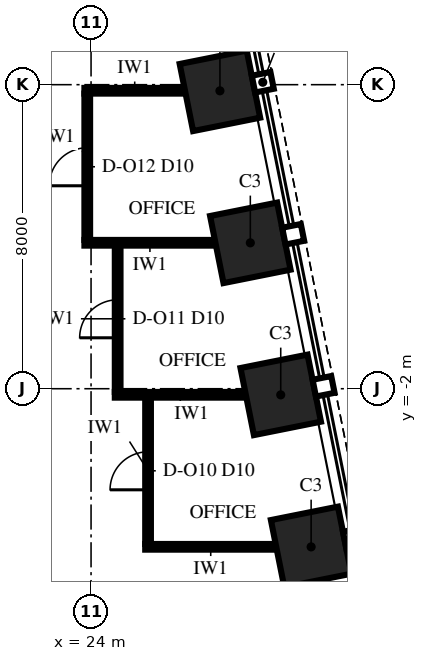
"""IFC4 building model, lengths in metres.
Left out: names, types, materials, properties, quantities, classifications, styles, units other than length and angle.
Written with IfcOpenShell. Run it as: python <this file> out.ifc"""

import sys

from ifc_helpers import new_model, si_unit, direction, frame, frame_2d, origin, origin_2d, place, context, subcontext, project, spatial, rectangle, extrude, element, fill, save


model = new_model("IFC4")
c1 = context("Model", 3, precision=1e-05, world=origin(), true_north=direction((0.0, 1.0)))
c2 = subcontext(c1, "Body", "Model", "MODEL_VIEW")
j1 = project(units=[si_unit("LENGTHUNIT", "METRE"), si_unit("PLANEANGLEUNIT", "RADIAN")], contexts=[c1])
p1 = place(None, origin())
s1 = spatial("IfcSite", under=j1, at=p1, CompositionType="ELEMENT")
p2 = place(p1, origin())
s2 = spatial("IfcBuilding", under=s1, at=p2, CompositionType="ELEMENT")
p3 = place(p2, frame((0.0, 0.0, 159.0)))
s3 = spatial("IfcBuildingStorey", under=s2, at=p3, CompositionType="ELEMENT", Elevation=159.0)
for number, where, z_axis, x_axis in (
    (1, (29.791, -6.162, 0.0), (0.0, 0.0, 1.0), (-0.196, 0.981, 0.0)),
    (2, (28.991, -2.162, 0.0), (0.0, 0.0, 1.0), (-0.196, 0.981, 0.0)),
    (3, (28.191, 1.838, 0.0), (0.0, 0.0, 1.0), (-0.196, 0.981, 0.0)),
    (4, (27.391, 5.838, 0.0), (0.0, 0.0, 1.0), (-0.196, 0.981, 0.0)),
):
    element("IfcColumn", number, at=place(p3, frame(where, z_axis=z_axis, x_axis=x_axis)), inside=s3, PredefinedType="COLUMN", context=c2, shape_type="SweptSolid", body=[
        extrude(rectangle(XDim=1.8, YDim=1.8, at=origin_2d()), origin(), (0.0, 0.0, 1.0), 4.0),
    ])
p4 = place(p3, frame((25.425, -6.16, 0.0), z_axis=(0.0, 0.0, 1.0), x_axis=(1.0, 0.0, 0.0)))
e5 = element("IfcWall", 5, at=p4, inside=s3, PredefinedType="PARTITIONING", context=c2, shape_type="SweptSolid", body=[
    extrude(rectangle(XDim=3.448, YDim=0.15, at=frame_2d((1.724, 0.0))), origin(), (0.0, 0.0, 1.0), 2.842),
])
for number, where, z_axis, x_axis in (
    (6, (24.625, -2.16, 0.0), (0.0, 0.0, 1.0), (1.0, 0.0, 0.0)),
    (7, (23.825, 1.84, 0.0), (0.0, 0.0, 1.0), (1.0, 0.0, 0.0)),
):
    element("IfcWall", number, at=place(p3, frame(where, z_axis=z_axis, x_axis=x_axis)), inside=s3, PredefinedType="PARTITIONING", context=c2, shape_type="SweptSolid", body=[
        extrude(rectangle(XDim=3.448, YDim=0.15, at=frame_2d((1.724, 0.0))), origin(), (0.0, 0.0, 1.0), 3.25),
    ])
p5 = place(p3, frame((23.825, 5.84, 0.0), z_axis=(0.0, 0.0, 1.0), x_axis=(1.0, 0.0, 0.0)))
e8 = element("IfcWall", 8, at=p5, inside=s3, PredefinedType="PARTITIONING", context=c2, shape_type="SweptSolid", body=[
    extrude(rectangle(XDim=2.648, YDim=0.15, at=frame_2d((1.324, 0.0))), origin(), (0.0, 0.0, 1.0), 2.842),
])
p6 = place(p3, frame((23.9, 1.915, 0.0), z_axis=(0.0, 0.0, 1.0), x_axis=(0.0, 1.0, 0.0)))
e9 = element("IfcWall", 9, at=p6, inside=s3, PredefinedType="PARTITIONING", context=c2, shape_type="SweptSolid", body=[
    extrude(rectangle(XDim=3.85, YDim=0.15, at=frame_2d((1.925, 0.0))), origin(), (0.0, 0.0, 1.0), 3.85),
])
p7 = place(p6, frame((1.425, 0.0, 0.0)))
e10 = element("IfcOpeningElement", 10, at=p7, cuts=e9, PredefinedType="OPENING", context=c2, shape_type="SweptSolid", body=[
    extrude(rectangle(XDim=1.0, YDim=2.3, at=frame_2d((0.5, 1.15))), frame((0.0, 0.09, 0.0), z_axis=(0.0, -1.0, 0.0), x_axis=(1.0, 0.0, 0.0)), (0.0, 0.0, 1.0), 0.18),
])
p8 = place(p3, frame((24.7, -2.085, 0.0), z_axis=(0.0, 0.0, 1.0), x_axis=(0.0, 1.0, 0.0)))
e11 = element("IfcWall", 11, at=p8, inside=s3, PredefinedType="PARTITIONING", context=c2, shape_type="SweptSolid", body=[
    extrude(rectangle(XDim=3.85, YDim=0.15, at=frame_2d((1.925, 0.0))), origin(), (0.0, 0.0, 1.0), 3.85),
])
p9 = place(p8, frame((1.425, 0.0, 0.0)))
e12 = element("IfcOpeningElement", 12, at=p9, cuts=e11, PredefinedType="OPENING", context=c2, shape_type="SweptSolid", body=[
    extrude(rectangle(XDim=1.0, YDim=2.3, at=frame_2d((0.5, 1.15))), frame((0.0, 0.09, 0.0), z_axis=(0.0, -1.0, 0.0), x_axis=(1.0, 0.0, 0.0)), (0.0, 0.0, 1.0), 0.18),
])
p10 = place(p3, frame((25.5, -6.085, 0.0), z_axis=(0.0, 0.0, 1.0), x_axis=(0.0, 1.0, 0.0)))
e13 = element("IfcWall", 13, at=p10, inside=s3, PredefinedType="PARTITIONING", context=c2, shape_type="SweptSolid", body=[
    extrude(rectangle(XDim=3.85, YDim=0.15, at=frame_2d((1.925, 0.0))), origin(), (0.0, 0.0, 1.0), 2.842),
])
p11 = place(p10, frame((1.425, 0.0, 0.0)))
e14 = element("IfcOpeningElement", 14, at=p11, cuts=e13, PredefinedType="OPENING", context=c2, shape_type="SweptSolid", body=[
    extrude(rectangle(XDim=1.0, YDim=2.3, at=frame_2d((0.5, 1.15))), frame((0.0, 0.09, 0.0), z_axis=(0.0, -1.0, 0.0), x_axis=(1.0, 0.0, 0.0)), (0.0, 0.0, 1.0), 0.18),
])
p12 = place(p11, origin())
e15 = element("IfcDoor", 15, at=p12, inside=s3, OperationType="SINGLE_SWING_LEFT", PredefinedType="DOOR", context=c2, shape_type="SweptSolid", body=[
    extrude(rectangle(XDim=1.0, YDim=2.3, at=frame_2d((0.5, 1.15))), frame((0.0, 0.075, 0.0), z_axis=(0.0, -1.0, 0.0), x_axis=(1.0, 0.0, 0.0)), (0.0, 0.0, 1.0), 0.149),
])
fill(e14, e15)
p13 = place(p9, origin())
e16 = element("IfcDoor", 16, at=p13, inside=s3, OperationType="SINGLE_SWING_LEFT", PredefinedType="DOOR", context=c2, shape_type="SweptSolid", body=[
    extrude(rectangle(XDim=1.0, YDim=2.3, at=frame_2d((0.5, 1.15))), frame((0.0, 0.075, 0.0), z_axis=(0.0, -1.0, 0.0), x_axis=(1.0, 0.0, 0.0)), (0.0, 0.0, 1.0), 0.149),
])
fill(e12, e16)
p14 = place(p7, origin())
e17 = element("IfcDoor", 17, at=p14, inside=s3, OperationType="SINGLE_SWING_LEFT", PredefinedType="DOOR", context=c2, shape_type="SweptSolid", body=[
    extrude(rectangle(XDim=1.0, YDim=2.3, at=frame_2d((0.5, 1.15))), frame((0.0, 0.075, 0.0), z_axis=(0.0, -1.0, 0.0), x_axis=(1.0, 0.0, 0.0)), (0.0, 0.0, 1.0), 0.149),
])
fill(e10, e17)
save(model, sys.argv[1])
